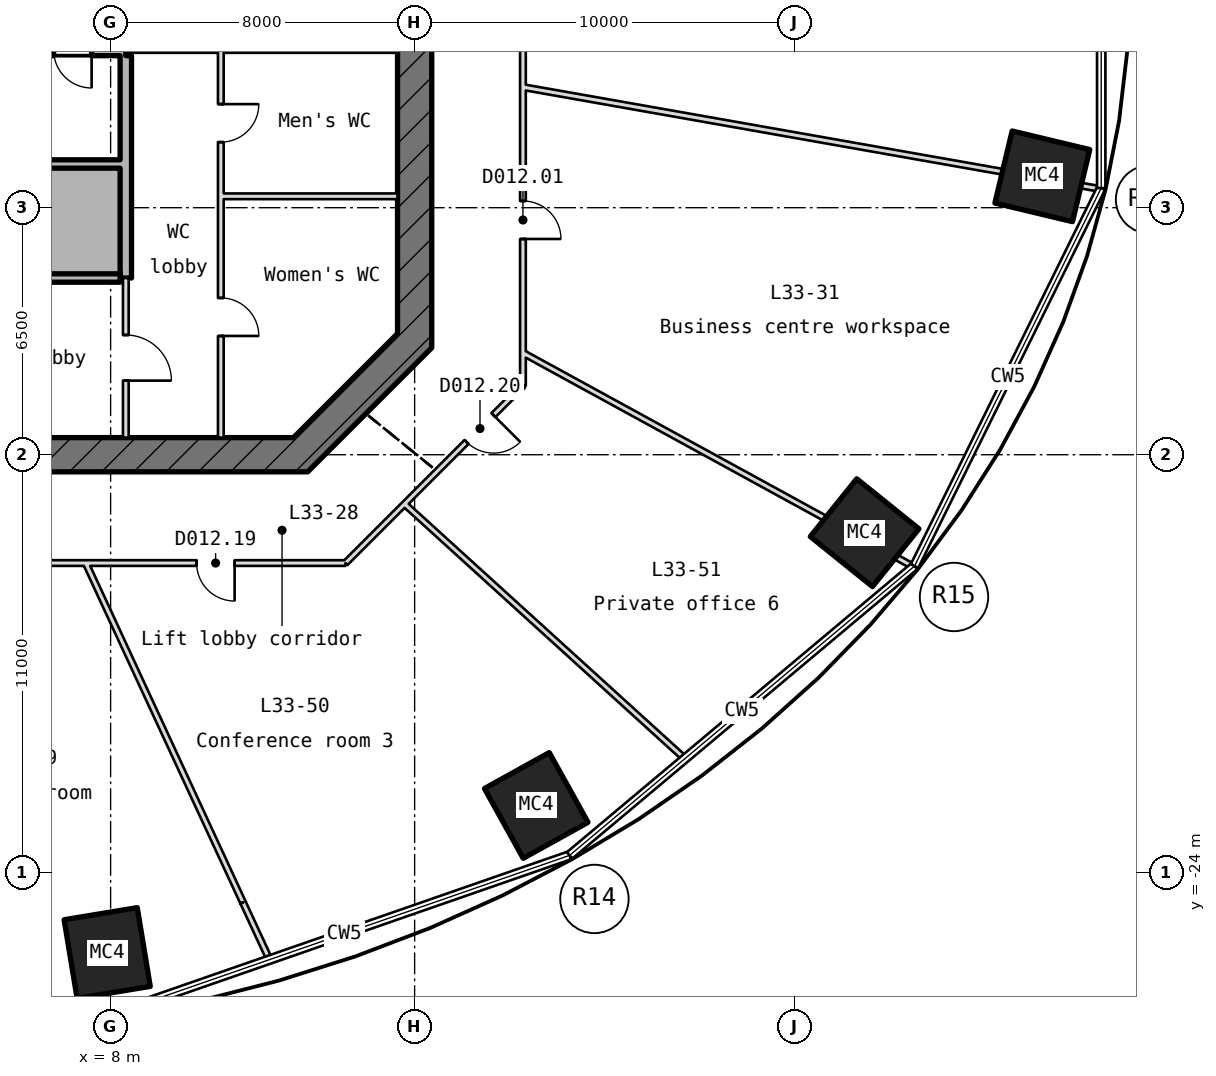
"""IFC4 building model, lengths in metres.
Left out: names, types, materials, properties, quantities, classifications, styles, units other than length and angle.
Written with IfcOpenShell. Run it as: python <this file> out.ifc"""

import sys

from ifc_helpers import new_model, si_unit, direction, frame, frame_2d, origin, origin_2d, place, context, subcontext, project, spatial, rectangle, hollow_rectangle, extrude, element, fill, save


model = new_model("IFC4")
c1 = context("Model", 3, precision=1e-05, world=origin(), true_north=direction((0.0, 1.0)))
c2 = subcontext(c1, "Body", "Model", "MODEL_VIEW")
j1 = project(units=[si_unit("LENGTHUNIT", "METRE"), si_unit("PLANEANGLEUNIT", "RADIAN")], contexts=[c1])
p1 = place(None, origin())
s1 = spatial("IfcSite", under=j1, at=p1, CompositionType="ELEMENT")
p2 = place(p1, origin())
s2 = spatial("IfcBuilding", under=s1, at=p2, CompositionType="ELEMENT")
p3 = place(p2, frame((0.0, 0.0, 155.65)))
s3 = spatial("IfcBuildingStorey", under=s2, at=p3, CompositionType="ELEMENT", Elevation=155.65)
for number, where, z_axis, x_axis in (
    (1, (7.91, -26.112, -0.25), (0.0, 0.0, 1.0), (-0.987, -0.163, 0.0)),
    (2, (19.2, -22.228, -0.25), (0.0, 0.0, 1.0), (-0.874, -0.485, 0.0)),
    (3, (27.841, -15.052, -0.25), (0.0, 0.0, 1.0), (-0.627, -0.779, 0.0)),
    (4, (32.517, -5.675, -0.25), (0.0, 0.0, 1.0), (-0.233, -0.972, 0.0)),
):
    element("IfcColumn", number, at=place(p3, frame(where, z_axis=z_axis, x_axis=x_axis)), inside=s3, PredefinedType="COLUMN", context=c2, shape_type="SweptSolid", body=[
        extrude(hollow_rectangle(XDim=1.95, YDim=2.1, WallThickness=0.075, at=origin_2d()), origin(), (0.0, 0.0, 1.0), 5.47),
    ])
p4 = place(p3, frame((12.868, -13.132, -0.25), z_axis=(0.0, 0.0, 1.0), x_axis=(0.707106781187, 0.707106781187, 0.0)))
e5 = element("IfcWall", 5, at=p4, inside=s3, PredefinedType="SHEAR", context=c2, shape_type="SweptSolid", body=[
    extrude(rectangle(XDim=4.615, YDim=0.9, at=frame_2d((2.308, 0.0))), origin(), (0.0, 0.0, 1.0), 5.47),
])
p5 = place(p3, frame((16.0, -10.186, -0.25), z_axis=(0.0, 0.0, 1.0), x_axis=(0.0, 1.0, 0.0)))
e6 = element("IfcWall", 6, at=p5, inside=s3, PredefinedType="SHEAR", context=c2, shape_type="SweptSolid", body=[
    extrude(rectangle(XDim=20.373, YDim=0.9, at=frame_2d((10.186, 0.0))), origin(), (0.0, 0.0, 1.0), 5.47),
])
p6 = place(p5, frame((8.986, 0.0, 0.25)))
e7 = element("IfcOpeningElement", 7, at=p6, cuts=e6, PredefinedType="OPENING", context=c2, shape_type="SweptSolid", body=[
    extrude(rectangle(XDim=2.4, YDim=2.1, at=frame_2d((1.2, 1.05))), frame((0.0, 0.46, 0.0), z_axis=(0.0, -1.0, 0.0), x_axis=(1.0, 0.0, 0.0)), (0.0, 0.0, 1.0), 0.92),
])
p7 = place(p5, frame((13.586, 0.0, 0.25)))
e8 = element("IfcOpeningElement", 8, at=p7, cuts=e6, PredefinedType="OPENING", context=c2, shape_type="SweptSolid", body=[
    extrude(rectangle(XDim=1.2, YDim=2.1, at=frame_2d((0.6, 1.05))), frame((0.0, 0.46, 0.0), z_axis=(0.0, -1.0, 0.0), x_axis=(1.0, 0.0, 0.0)), (0.0, 0.0, 1.0), 0.92),
])
p8 = place(p3, frame((-13.186, -13.0, -0.25), z_axis=(0.0, 0.0, 1.0), x_axis=(1.0, 0.0, 0.0)))
e9 = element("IfcWall", 9, at=p8, inside=s3, PredefinedType="SHEAR", context=c2, shape_type="SweptSolid", body=[
    extrude(rectangle(XDim=26.373, YDim=0.9, at=frame_2d((13.186, 0.0))), origin(), (0.0, 0.0, 1.0), 5.47),
])
p9 = place(p8, frame((2.886, 0.0, 0.25)))
e10 = element("IfcOpeningElement", 10, at=p9, cuts=e9, PredefinedType="OPENING", context=c2, shape_type="SweptSolid", body=[
    extrude(rectangle(XDim=1.2, YDim=2.1, at=frame_2d((0.6, 1.05))), frame((0.0, 0.46, 0.0), z_axis=(0.0, -1.0, 0.0), x_axis=(1.0, 0.0, 0.0)), (0.0, 0.0, 1.0), 0.92),
])
p10 = place(p8, frame((6.886, 0.0, 0.25)))
e11 = element("IfcOpeningElement", 11, at=p10, cuts=e9, PredefinedType="OPENING", context=c2, shape_type="SweptSolid", body=[
    extrude(rectangle(XDim=1.4, YDim=2.1, at=frame_2d((0.7, 1.05))), frame((0.0, 0.46, 0.0), z_axis=(0.0, -1.0, 0.0), x_axis=(1.0, 0.0, 0.0)), (0.0, 0.0, 1.0), 0.92),
])
p11 = place(p8, frame((15.486, 0.0, 0.25)))
e12 = element("IfcOpeningElement", 12, at=p11, cuts=e9, PredefinedType="OPENING", context=c2, shape_type="SweptSolid", body=[
    extrude(rectangle(XDim=1.4, YDim=2.1, at=frame_2d((0.7, 1.05))), frame((0.0, 0.46, 0.0), z_axis=(0.0, -1.0, 0.0), x_axis=(1.0, 0.0, 0.0)), (0.0, 0.0, 1.0), 0.92),
])
p12 = place(p3, frame((-2.69, -8.35, 0.0), z_axis=(0.0, 0.0, 1.0), x_axis=(1.0, 0.0, 0.0)))
e13 = element("IfcWall", 13, at=p12, inside=s3, PredefinedType="STANDARD", context=c2, shape_type="SweptSolid", body=[
    extrude(rectangle(XDim=10.94, YDim=0.22, at=frame_2d((5.47, 0.0))), origin(), (0.0, 0.0, 1.0), 5.22),
])
p13 = place(p12, frame((0.74, 0.0, 0.0)))
e14 = element("IfcOpeningElement", 14, at=p13, cuts=e13, PredefinedType="OPENING", context=c2, shape_type="SweptSolid", body=[
    extrude(rectangle(XDim=1.1, YDim=2.1, at=frame_2d((0.55, 1.05))), frame((0.0, 0.12, 0.0), z_axis=(0.0, -1.0, 0.0), x_axis=(1.0, 0.0, 0.0)), (0.0, 0.0, 1.0), 0.24),
])
p14 = place(p12, frame((3.54, 0.0, 0.0)))
e15 = element("IfcOpeningElement", 15, at=p14, cuts=e13, PredefinedType="OPENING", context=c2, shape_type="SweptSolid", body=[
    extrude(rectangle(XDim=1.1, YDim=2.1, at=frame_2d((0.55, 1.05))), frame((0.0, 0.12, 0.0), z_axis=(0.0, -1.0, 0.0), x_axis=(1.0, 0.0, 0.0)), (0.0, 0.0, 1.0), 0.24),
])
p15 = place(p3, frame((10.975, -6.2, 0.0), z_axis=(0.0, 0.0, 1.0), x_axis=(1.0, 0.0, 0.0)))
e16 = element("IfcWall", 16, at=p15, inside=s3, PredefinedType="PARTITIONING", context=c2, shape_type="SweptSolid", body=[
    extrude(rectangle(XDim=4.575, YDim=0.15, at=frame_2d((2.288, 0.0))), origin(), (0.0, 0.0, 1.0), 5.22),
])
p16 = place(p3, frame((-8.25, -5.35, 0.0), z_axis=(0.0, 0.0, 1.0), x_axis=(1.0, 0.0, 0.0)))
e17 = element("IfcWall", 17, at=p16, inside=s3, PredefinedType="STANDARD", context=c2, shape_type="SweptSolid", body=[
    extrude(rectangle(XDim=16.5, YDim=0.22, at=frame_2d((8.25, 0.0))), origin(), (0.0, 0.0, 1.0), 5.22),
])
p17 = place(p3, frame((-8.4, -2.35, -0.25), z_axis=(0.0, 0.0, 1.0), x_axis=(1.0, 0.0, 0.0)))
e18 = element("IfcWall", 18, at=p17, inside=s3, PredefinedType="SHEAR", context=c2, shape_type="SweptSolid", body=[
    extrude(rectangle(XDim=16.8, YDim=0.3, at=frame_2d((8.4, 0.0))), origin(), (0.0, 0.0, 1.0), 5.47),
])
p18 = place(p17, frame((0.9, 0.0, 0.25)))
e19 = element("IfcOpeningElement", 19, at=p18, cuts=e18, PredefinedType="OPENING", context=c2, shape_type="SweptSolid", body=[
    extrude(rectangle(XDim=1.0, YDim=2.1, at=frame_2d((0.5, 1.05))), frame((0.0, 0.16, 0.0), z_axis=(0.0, -1.0, 0.0), x_axis=(1.0, 0.0, 0.0)), (0.0, 0.0, 1.0), 0.32),
])
p19 = place(p17, frame((14.9, 0.0, 0.25)))
e20 = element("IfcOpeningElement", 20, at=p19, cuts=e18, PredefinedType="OPENING", context=c2, shape_type="SweptSolid", body=[
    extrude(rectangle(XDim=1.0, YDim=2.1, at=frame_2d((0.5, 1.05))), frame((0.0, 0.16, 0.0), z_axis=(0.0, -1.0, 0.0), x_axis=(1.0, 0.0, 0.0)), (0.0, 0.0, 1.0), 0.32),
])
p20 = place(p3, frame((8.4, -2.35, 0.0), z_axis=(0.0, 0.0, 1.0), x_axis=(1.0, 0.0, 0.0)))
e21 = element("IfcWall", 21, at=p20, inside=s3, PredefinedType="PARTITIONING", context=c2, shape_type="SweptSolid", body=[
    extrude(rectangle(XDim=7.15, YDim=0.15, at=frame_2d((3.575, 0.0))), origin(), (0.0, 0.0, 1.0), 5.22),
])
p21 = place(p3, frame((8.4, -12.55, 0.0), z_axis=(0.0, 0.0, 1.0), x_axis=(0.0, 1.0, 0.0)))
e22 = element("IfcWall", 22, at=p21, inside=s3, PredefinedType="PARTITIONING", context=c2, shape_type="SweptSolid", body=[
    extrude(rectangle(XDim=4.2, YDim=0.15, at=frame_2d((2.1, 0.0))), origin(), (0.0, 0.0, 1.0), 5.22),
])
p22 = place(p21, frame((1.5, 0.0, 0.0)))
e23 = element("IfcOpeningElement", 23, at=p22, cuts=e22, PredefinedType="OPENING", context=c2, shape_type="SweptSolid", body=[
    extrude(rectangle(XDim=1.2, YDim=2.1, at=frame_2d((0.6, 1.05))), frame((0.0, 0.085, 0.0), z_axis=(0.0, -1.0, 0.0), x_axis=(1.0, 0.0, 0.0)), (0.0, 0.0, 1.0), 0.17),
])
p23 = place(p3, frame((8.4, -8.35, -0.25), z_axis=(0.0, 0.0, 1.0), x_axis=(0.0, 1.0, 0.0)))
e24 = element("IfcWall", 24, at=p23, inside=s3, PredefinedType="SHEAR", context=c2, shape_type="SweptSolid", body=[
    extrude(rectangle(XDim=5.85, YDim=0.3, at=frame_2d((2.925, 0.0))), origin(), (0.0, 0.0, 1.0), 5.47),
])
p24 = place(p3, frame((10.9, -12.55, 0.0), z_axis=(0.0, 0.0, 1.0), x_axis=(0.0, 1.0, 0.0)))
e25 = element("IfcWall", 25, at=p24, inside=s3, PredefinedType="PARTITIONING", context=c2, shape_type="SweptSolid", body=[
    extrude(rectangle(XDim=10.125, YDim=0.15, at=frame_2d((5.062, 0.0))), origin(), (0.0, 0.0, 1.0), 5.22),
])
p25 = place(p24, frame((7.775, 0.0, 0.0)))
e26 = element("IfcOpeningElement", 26, at=p25, cuts=e25, PredefinedType="OPENING", context=c2, shape_type="SweptSolid", body=[
    extrude(rectangle(XDim=1.0, YDim=2.1, at=frame_2d((0.5, 1.05))), frame((0.0, 0.085, 0.0), z_axis=(0.0, -1.0, 0.0), x_axis=(1.0, 0.0, 0.0)), (0.0, 0.0, 1.0), 0.17),
])
p26 = place(p24, frame((2.675, 0.0, 0.0)))
e27 = element("IfcOpeningElement", 27, at=p26, cuts=e25, PredefinedType="OPENING", context=c2, shape_type="SweptSolid", body=[
    extrude(rectangle(XDim=1.0, YDim=2.1, at=frame_2d((0.5, 1.05))), frame((0.0, 0.085, 0.0), z_axis=(0.0, -1.0, 0.0), x_axis=(1.0, 0.0, 0.0)), (0.0, 0.0, 1.0), 0.17),
])
p27 = place(p3, frame((-14.18, -15.85, 0.0), z_axis=(0.0, 0.0, 1.0), x_axis=(1.0, 0.0, 0.0)))
e28 = element("IfcWall", 28, at=p27, inside=s3, PredefinedType="PARTITIONING", context=c2, shape_type="SweptSolid", body=[
    extrude(rectangle(XDim=28.361, YDim=0.15, at=frame_2d((14.18, 0.0))), origin(), (0.0, 0.0, 1.0), 5.22),
])
p28 = place(p27, frame((2.61, 0.0, 0.0)))
e29 = element("IfcOpeningElement", 29, at=p28, cuts=e28, PredefinedType="OPENING", context=c2, shape_type="SweptSolid", body=[
    extrude(rectangle(XDim=1.0, YDim=2.1, at=frame_2d((0.5, 1.05))), frame((0.0, 0.085, 0.0), z_axis=(0.0, -1.0, 0.0), x_axis=(1.0, 0.0, 0.0)), (0.0, 0.0, 1.0), 0.17),
])
p29 = place(p27, frame((8.368, 0.0, 0.0)))
e30 = element("IfcOpeningElement", 30, at=p29, cuts=e28, PredefinedType="OPENING", context=c2, shape_type="SweptSolid", body=[
    extrude(rectangle(XDim=1.0, YDim=2.1, at=frame_2d((0.5, 1.05))), frame((0.0, 0.085, 0.0), z_axis=(0.0, -1.0, 0.0), x_axis=(1.0, 0.0, 0.0)), (0.0, 0.0, 1.0), 0.17),
])
p30 = place(p27, frame((13.475, 0.0, 0.0)))
e31 = element("IfcOpeningElement", 31, at=p30, cuts=e28, PredefinedType="OPENING", context=c2, shape_type="SweptSolid", body=[
    extrude(rectangle(XDim=1.0, YDim=2.1, at=frame_2d((0.5, 1.05))), frame((0.0, 0.085, 0.0), z_axis=(0.0, -1.0, 0.0), x_axis=(1.0, 0.0, 0.0)), (0.0, 0.0, 1.0), 0.17),
])
p31 = place(p27, frame((18.479, 0.0, 0.0)))
e32 = element("IfcOpeningElement", 32, at=p31, cuts=e28, PredefinedType="OPENING", context=c2, shape_type="SweptSolid", body=[
    extrude(rectangle(XDim=1.0, YDim=2.1, at=frame_2d((0.5, 1.05))), frame((0.0, 0.085, 0.0), z_axis=(0.0, -1.0, 0.0), x_axis=(1.0, 0.0, 0.0)), (0.0, 0.0, 1.0), 0.17),
])
p32 = place(p27, frame((24.443, 0.0, 0.0)))
e33 = element("IfcOpeningElement", 33, at=p32, cuts=e28, PredefinedType="OPENING", context=c2, shape_type="SweptSolid", body=[
    extrude(rectangle(XDim=1.0, YDim=2.1, at=frame_2d((0.5, 1.05))), frame((0.0, 0.085, 0.0), z_axis=(0.0, -1.0, 0.0), x_axis=(1.0, 0.0, 0.0)), (0.0, 0.0, 1.0), 0.17),
])
p33 = place(p3, frame((14.18, -15.85, 0.0), z_axis=(0.0, 0.0, 1.0), x_axis=(0.707106781187, 0.707106781187, 0.0)))
e34 = element("IfcWall", 34, at=p33, inside=s3, PredefinedType="PARTITIONING", context=c2, shape_type="SweptSolid", body=[
    extrude(rectangle(XDim=6.604, YDim=0.15, at=frame_2d((3.302, 0.0))), origin(), (0.0, 0.0, 1.0), 5.22),
])
p34 = place(p33, frame((4.506, 0.0, 0.0)))
e35 = element("IfcOpeningElement", 35, at=p34, cuts=e34, PredefinedType="OPENING", context=c2, shape_type="SweptSolid", body=[
    extrude(rectangle(XDim=1.0, YDim=2.1, at=frame_2d((0.5, 1.05))), frame((0.0, 0.085, 0.0), z_axis=(0.0, -1.0, 0.0), x_axis=(1.0, 0.0, 0.0)), (0.0, 0.0, 1.0), 0.17),
])
p35 = place(p3, frame((18.85, -11.18, 0.0), z_axis=(0.0, 0.0, 1.0), x_axis=(0.0, 1.0, 0.0)))
e36 = element("IfcWall", 36, at=p35, inside=s3, PredefinedType="PARTITIONING", context=c2, shape_type="SweptSolid", body=[
    extrude(rectangle(XDim=20.688, YDim=0.15, at=frame_2d((10.344, 0.0))), origin(), (0.0, 0.0, 1.0), 5.22),
])
p36 = place(p35, frame((3.857, 0.0, 0.0)))
e37 = element("IfcOpeningElement", 37, at=p36, cuts=e36, PredefinedType="OPENING", context=c2, shape_type="SweptSolid", body=[
    extrude(rectangle(XDim=1.0, YDim=2.1, at=frame_2d((0.5, 1.05))), frame((0.0, 0.085, 0.0), z_axis=(0.0, -1.0, 0.0), x_axis=(1.0, 0.0, 0.0)), (0.0, 0.0, 1.0), 0.17),
])
p37 = place(p35, frame((10.974, 0.0, 0.0)))
e38 = element("IfcOpeningElement", 38, at=p37, cuts=e36, PredefinedType="OPENING", context=c2, shape_type="SweptSolid", body=[
    extrude(rectangle(XDim=1.8, YDim=2.1, at=frame_2d((0.9, 1.05))), frame((0.0, 0.085, 0.0), z_axis=(0.0, -1.0, 0.0), x_axis=(1.0, 0.0, 0.0)), (0.0, 0.0, 1.0), 0.17),
])
p38 = place(p35, frame((17.788, 0.0, 0.0)))
e39 = element("IfcOpeningElement", 39, at=p38, cuts=e36, PredefinedType="OPENING", context=c2, shape_type="SweptSolid", body=[
    extrude(rectangle(XDim=1.0, YDim=2.1, at=frame_2d((0.5, 1.05))), frame((0.0, 0.085, 0.0), z_axis=(0.0, -1.0, 0.0), x_axis=(1.0, 0.0, 0.0)), (0.0, 0.0, 1.0), 0.17),
])
p39 = place(p3, frame((12.172, -26.267, 0.0), z_axis=(0.0, 0.0, 1.0), x_axis=(-0.420455033989, 0.907313377171, 0.0)))
e40 = element("IfcWall", 40, at=p39, inside=s3, PredefinedType="PARTITIONING", context=c2, shape_type="SweptSolid", body=[
    extrude(rectangle(XDim=1.64, YDim=0.15, at=frame_2d((0.82, 0.0))), origin(), (0.0, 0.0, 1.0), 5.22),
])
p40 = place(p3, frame((11.483, -24.779, 0.0), z_axis=(0.0, 0.0, 1.0), x_axis=(-0.420442084923, 0.907319377742, 0.0)))
e41 = element("IfcWall", 41, at=p40, inside=s3, PredefinedType="PARTITIONING", context=c2, shape_type="SweptSolid", body=[
    extrude(rectangle(XDim=9.841, YDim=0.15, at=frame_2d((4.921, 0.0))), origin(), (0.0, 0.0, 1.0), 4.676),
])
p41 = place(p3, frame((23.096, -20.984, 0.0), z_axis=(0.0, 0.0, 1.0), x_axis=(-0.740122200338, 0.672472399856, 0.0)))
e42 = element("IfcWall", 42, at=p41, inside=s3, PredefinedType="PARTITIONING", context=c2, shape_type="SweptSolid", body=[
    extrude(rectangle(XDim=9.946, YDim=0.15, at=frame_2d((4.973, 0.0))), origin(), (0.0, 0.0, 1.0), 5.22),
])
p42 = place(p3, frame((29.113, -15.938, 0.0), z_axis=(0.0, 0.0, 1.0), x_axis=(-0.877182195779, 0.480157677652, 0.0)))
e43 = element("IfcWall", 43, at=p42, inside=s3, PredefinedType="PARTITIONING", context=c2, shape_type="SweptSolid", body=[
    extrude(rectangle(XDim=2.109, YDim=0.15, at=frame_2d((1.054, 0.0))), origin(), (0.0, 0.0, 1.0), 5.22),
])
p43 = place(p3, frame((27.263, -14.926, 0.0), z_axis=(0.0, 0.0, 1.0), x_axis=(-0.877149368701, 0.480217643352, 0.0)))
e44 = element("IfcWall", 44, at=p43, inside=s3, PredefinedType="PARTITIONING", context=c2, shape_type="SweptSolid", body=[
    extrude(rectangle(XDim=9.591, YDim=0.15, at=frame_2d((4.796, 0.0))), origin(), (0.0, 0.0, 1.0), 4.608),
])
p44 = place(p3, frame((34.033, -6.006, 0.0), z_axis=(0.0, 0.0, 1.0), x_axis=(-0.984792910243, 0.173732334166, 0.0)))
e45 = element("IfcWall", 45, at=p44, inside=s3, PredefinedType="PARTITIONING", context=c2, shape_type="SweptSolid", body=[
    extrude(rectangle(XDim=2.102, YDim=0.15, at=frame_2d((1.051, 0.0))), origin(), (0.0, 0.0, 1.0), 5.22),
])
p45 = place(p3, frame((31.963, -5.641, 0.0), z_axis=(0.0, 0.0, 1.0), x_axis=(-0.984781159157, 0.17379893144, 0.0)))
e46 = element("IfcWall", 46, at=p45, inside=s3, PredefinedType="PARTITIONING", context=c2, shape_type="SweptSolid", body=[
    extrude(rectangle(XDim=13.315, YDim=0.15, at=frame_2d((6.658, 0.0))), origin(), (0.0, 0.0, 1.0), 4.527),
])
p46 = place(p22, frame((1.2, 0.0, 0.0), z_axis=(0.0, 0.0, 1.0), x_axis=(-1.0, 0.0, 0.0)))
e47 = element("IfcDoor", 47, at=p46, inside=s3, OperationType="SINGLE_SWING_LEFT", PredefinedType="DOOR", context=c2, shape_type="SweptSolid", body=[
    extrude(rectangle(XDim=1.2, YDim=2.1, at=frame_2d((0.6, 1.05))), frame((0.0, 0.025, 0.0), z_axis=(0.0, -1.0, 0.0), x_axis=(1.0, 0.0, 0.0)), (0.0, 0.0, 1.0), 0.05),
])
fill(e23, e47)
p47 = place(p25, frame((1.0, 0.0, 0.0), z_axis=(0.0, 0.0, 1.0), x_axis=(-1.0, 0.0, 0.0)))
e48 = element("IfcDoor", 48, at=p47, inside=s3, OperationType="SINGLE_SWING_LEFT", PredefinedType="DOOR", context=c2, shape_type="SweptSolid", body=[
    extrude(rectangle(XDim=1.0, YDim=2.1, at=frame_2d((0.5, 1.05))), frame((0.0, 0.025, 0.0), z_axis=(0.0, -1.0, 0.0), x_axis=(1.0, 0.0, 0.0)), (0.0, 0.0, 1.0), 0.05),
])
fill(e26, e48)
p48 = place(p26, frame((1.0, 0.0, 0.0), z_axis=(0.0, 0.0, 1.0), x_axis=(-1.0, 0.0, 0.0)))
e49 = element("IfcDoor", 49, at=p48, inside=s3, OperationType="SINGLE_SWING_LEFT", PredefinedType="DOOR", context=c2, shape_type="SweptSolid", body=[
    extrude(rectangle(XDim=1.0, YDim=2.1, at=frame_2d((0.5, 1.05))), frame((0.0, 0.025, 0.0), z_axis=(0.0, -1.0, 0.0), x_axis=(1.0, 0.0, 0.0)), (0.0, 0.0, 1.0), 0.05),
])
fill(e27, e49)
p49 = place(p36, frame((1.0, 0.0, 0.0), z_axis=(0.0, 0.0, 1.0), x_axis=(-1.0, 0.0, 0.0)))
e50 = element("IfcDoor", 50, at=p49, inside=s3, OperationType="SINGLE_SWING_LEFT", PredefinedType="DOOR", context=c2, shape_type="SweptSolid", body=[
    extrude(rectangle(XDim=1.0, YDim=2.1, at=frame_2d((0.5, 1.05))), frame((0.0, 0.025, 0.0), z_axis=(0.0, -1.0, 0.0), x_axis=(1.0, 0.0, 0.0)), (0.0, 0.0, 1.0), 0.05),
])
fill(e37, e50)
p50 = place(p32, frame((1.0, 0.0, 0.0), z_axis=(0.0, 0.0, 1.0), x_axis=(-1.0, 0.0, 0.0)))
e51 = element("IfcDoor", 51, at=p50, inside=s3, OperationType="SINGLE_SWING_LEFT", PredefinedType="DOOR", context=c2, shape_type="SweptSolid", body=[
    extrude(rectangle(XDim=1.0, YDim=2.1, at=frame_2d((0.5, 1.05))), frame((0.0, 0.025, 0.0), z_axis=(0.0, -1.0, 0.0), x_axis=(1.0, 0.0, 0.0)), (0.0, 0.0, 1.0), 0.05),
])
fill(e33, e51)
p51 = place(p34, frame((1.0, 0.0, 0.0), z_axis=(0.0, 0.0, 1.0), x_axis=(-1.0, 0.0, 0.0)))
e52 = element("IfcDoor", 52, at=p51, inside=s3, OperationType="SINGLE_SWING_LEFT", PredefinedType="DOOR", context=c2, shape_type="SweptSolid", body=[
    extrude(rectangle(XDim=1.0, YDim=2.1, at=frame_2d((0.5, 1.05))), frame((0.0, 0.025, 0.0), z_axis=(0.0, -1.0, 0.0), x_axis=(1.0, 0.0, 0.0)), (0.0, 0.0, 1.0), 0.05),
])
fill(e35, e52)
save(model, sys.argv[1])
